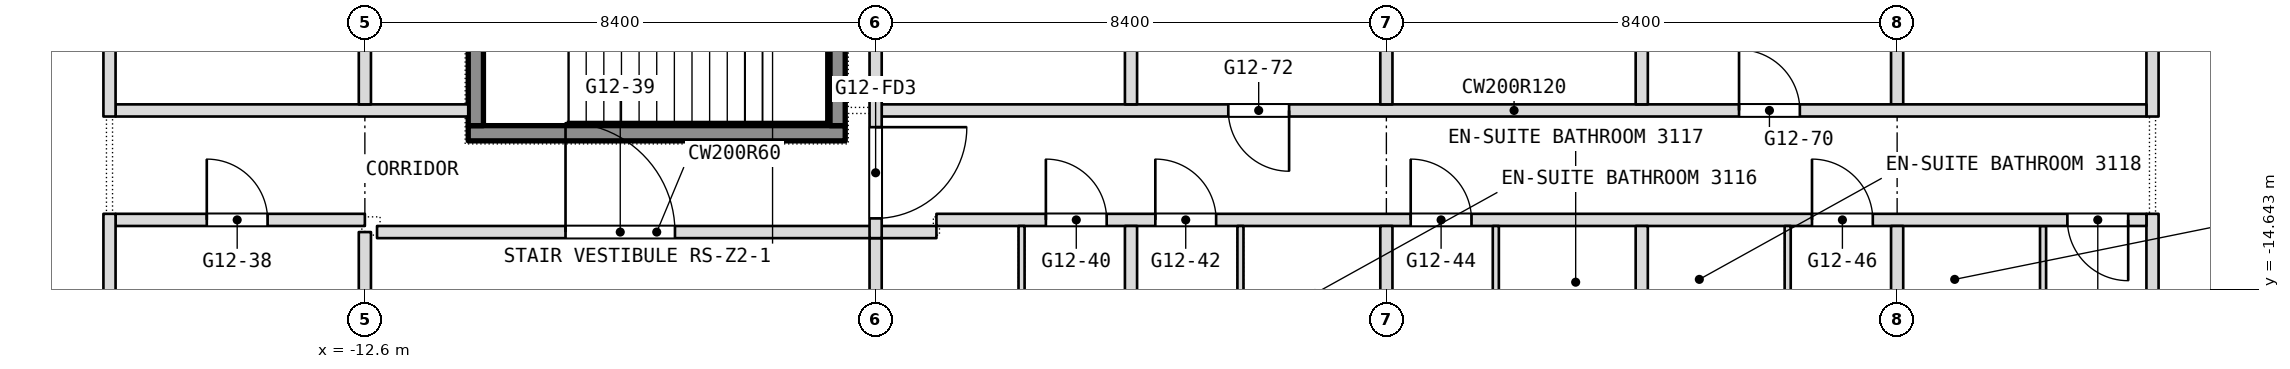
"""IFC4 building model, lengths in metres.
Left out: names, types, materials, properties, quantities, classifications, styles, units other than length and angle.
Written with IfcOpenShell. Run it as: python <this file> out.ifc"""

import sys

from ifc_helpers import new_model, si_unit, direction, frame, frame_2d, origin, place, context, subcontext, project, spatial, rectangle, extrude, element, fill, save


model = new_model("IFC4")
c1 = context("Model", 3, precision=1e-05, world=origin(), true_north=direction((0.0, 1.0)))
c2 = subcontext(c1, "Body", "Model", "MODEL_VIEW")
j1 = project(units=[si_unit("LENGTHUNIT", "METRE"), si_unit("PLANEANGLEUNIT", "RADIAN")], contexts=[c1])
p1 = place(None, origin())
s1 = spatial("IfcSite", under=j1, at=p1, CompositionType="ELEMENT")
p2 = place(p1, origin())
s2 = spatial("IfcBuilding", under=s1, at=p2, CompositionType="ELEMENT")
p3 = place(p2, frame((0.0, 0.0, 137.3)))
s3 = spatial("IfcBuildingStorey", under=s2, at=p3, CompositionType="ELEMENT", Elevation=137.3)
p4 = place(p3, frame((16.8, -22.186, 0.0), z_axis=(0.0, 0.0, 1.0), x_axis=(0.0, 1.0, 0.0)))
e1 = element("IfcWall", 1, at=p4, inside=s3, PredefinedType="PARTITIONING", context=c2, shape_type="SweptSolid", body=[
    extrude(rectangle(XDim=8.786, YDim=0.2, at=frame_2d((4.393, 0.0))), origin(), (0.0, 0.0, 1.0), 3.34),
])
p5 = place(p3, frame((16.8, -11.8, 0.0), z_axis=(0.0, 0.0, 1.0), x_axis=(0.0, 1.0, 0.0)))
e2 = element("IfcWall", 2, at=p5, inside=s3, PredefinedType="PARTITIONING", context=c2, shape_type="SweptSolid", body=[
    extrude(rectangle(XDim=9.9, YDim=0.2, at=frame_2d((4.95, 0.0))), origin(), (0.0, 0.0, 1.0), 3.34),
])
p6 = place(p3, frame((15.0, -16.25, 0.0), z_axis=(0.0, 0.0, 1.0), x_axis=(0.0, 1.0, 0.0)))
e3 = element("IfcWall", 3, at=p6, inside=s3, PredefinedType="PARTITIONING", context=c2, shape_type="SweptSolid", body=[
    extrude(rectangle(XDim=2.65, YDim=0.1, at=frame_2d((1.325, 0.0))), origin(), (0.0, 0.0, 1.0), 3.34),
])
p7 = place(p3, frame((-12.4, -13.7, 0.0), z_axis=(0.0, 0.0, 1.0), x_axis=(1.0, 0.0, 0.0)))
e4 = element("IfcWall", 4, at=p7, inside=s3, PredefinedType="PARTITIONING", context=c2, shape_type="SweptSolid", body=[
    extrude(rectangle(XDim=9.2, YDim=0.2, at=frame_2d((4.6, 0.0))), origin(), (0.0, 0.0, 1.0), 3.34),
])
p8 = place(p7, frame((3.1, 0.0, 0.0)))
e5 = element("IfcOpeningElement", 5, at=p8, cuts=e4, PredefinedType="OPENING", context=c2, shape_type="SweptSolid", body=[
    extrude(rectangle(XDim=1.8, YDim=2.1, at=frame_2d((0.9, 1.05))), frame((0.0, 0.1, 0.0), z_axis=(0.0, -1.0, 0.0), x_axis=(1.0, 0.0, 0.0)), (0.0, 0.0, 1.0), 0.2),
])
p9 = place(p3, frame((-16.7, -13.5, 0.0), z_axis=(0.0, 0.0, 1.0), x_axis=(1.0, 0.0, 0.0)))
e6 = element("IfcWall", 6, at=p9, inside=s3, PredefinedType="PARTITIONING", context=c2, shape_type="SweptSolid", body=[
    extrude(rectangle(XDim=4.1, YDim=0.2, at=frame_2d((2.05, 0.0))), origin(), (0.0, 0.0, 1.0), 3.34),
])
p10 = place(p9, frame((1.5, 0.0, 0.0)))
e7 = element("IfcOpeningElement", 7, at=p10, cuts=e6, PredefinedType="OPENING", context=c2, shape_type="SweptSolid", body=[
    extrude(rectangle(XDim=1.0, YDim=2.1, at=frame_2d((0.5, 1.05))), frame((0.0, 0.1, 0.0), z_axis=(0.0, -1.0, 0.0), x_axis=(1.0, 0.0, 0.0)), (0.0, 0.0, 1.0), 0.2),
])
p11 = place(p3, frame((-3.2, -13.5, 0.0), z_axis=(0.0, 0.0, 1.0), x_axis=(1.0, 0.0, 0.0)))
e8 = element("IfcWall", 8, at=p11, inside=s3, PredefinedType="PARTITIONING", context=c2, shape_type="SweptSolid", body=[
    extrude(rectangle(XDim=19.9, YDim=0.2, at=frame_2d((9.95, 0.0))), origin(), (0.0, 0.0, 1.0), 3.34),
])
p12 = place(p11, frame((1.8, 0.0, 0.0)))
e9 = element("IfcOpeningElement", 9, at=p12, cuts=e8, PredefinedType="OPENING", context=c2, shape_type="SweptSolid", body=[
    extrude(rectangle(XDim=1.0, YDim=2.1, at=frame_2d((0.5, 1.05))), frame((0.0, 0.1, 0.0), z_axis=(0.0, -1.0, 0.0), x_axis=(1.0, 0.0, 0.0)), (0.0, 0.0, 1.0), 0.2),
])
p13 = place(p11, frame((3.6, 0.0, 0.0)))
e10 = element("IfcOpeningElement", 10, at=p13, cuts=e8, PredefinedType="OPENING", context=c2, shape_type="SweptSolid", body=[
    extrude(rectangle(XDim=1.0, YDim=2.1, at=frame_2d((0.5, 1.05))), frame((0.0, 0.1, 0.0), z_axis=(0.0, -1.0, 0.0), x_axis=(1.0, 0.0, 0.0)), (0.0, 0.0, 1.0), 0.2),
])
p14 = place(p11, frame((7.8, 0.0, 0.0)))
e11 = element("IfcOpeningElement", 11, at=p14, cuts=e8, PredefinedType="OPENING", context=c2, shape_type="SweptSolid", body=[
    extrude(rectangle(XDim=1.0, YDim=2.1, at=frame_2d((0.5, 1.05))), frame((0.0, 0.1, 0.0), z_axis=(0.0, -1.0, 0.0), x_axis=(1.0, 0.0, 0.0)), (0.0, 0.0, 1.0), 0.2),
])
p15 = place(p11, frame((14.4, 0.0, 0.0)))
e12 = element("IfcOpeningElement", 12, at=p15, cuts=e8, PredefinedType="OPENING", context=c2, shape_type="SweptSolid", body=[
    extrude(rectangle(XDim=1.0, YDim=2.1, at=frame_2d((0.5, 1.05))), frame((0.0, 0.1, 0.0), z_axis=(0.0, -1.0, 0.0), x_axis=(1.0, 0.0, 0.0)), (0.0, 0.0, 1.0), 0.2),
])
p16 = place(p11, frame((18.6, 0.0, 0.0)))
e13 = element("IfcOpeningElement", 13, at=p16, cuts=e8, PredefinedType="OPENING", context=c2, shape_type="SweptSolid", body=[
    extrude(rectangle(XDim=1.0, YDim=2.1, at=frame_2d((0.5, 1.05))), frame((0.0, 0.1, 0.0), z_axis=(0.0, -1.0, 0.0), x_axis=(1.0, 0.0, 0.0)), (0.0, 0.0, 1.0), 0.2),
])
p17 = place(p3, frame((12.6, -21.175, 0.0), z_axis=(0.0, 0.0, 1.0), x_axis=(0.0, 1.0, 0.0)))
e14 = element("IfcWall", 14, at=p17, inside=s3, PredefinedType="PARTITIONING", context=c2, shape_type="SweptSolid", body=[
    extrude(rectangle(XDim=7.575, YDim=0.2, at=frame_2d((3.788, 0.0))), origin(), (0.0, 0.0, 1.0), 3.34),
])
p18 = place(p3, frame((12.6, -11.6, 0.0), z_axis=(0.0, 0.0, 1.0), x_axis=(0.0, 1.0, 0.0)))
e15 = element("IfcWall", 15, at=p18, inside=s3, PredefinedType="PARTITIONING", context=c2, shape_type="SweptSolid", body=[
    extrude(rectangle(XDim=3.9, YDim=0.2, at=frame_2d((1.95, 0.0))), origin(), (0.0, 0.0, 1.0), 3.34),
])
p19 = place(p3, frame((-16.7, -11.7, 0.0), z_axis=(0.0, 0.0, 1.0), x_axis=(1.0, 0.0, 0.0)))
e16 = element("IfcWall", 16, at=p19, inside=s3, PredefinedType="PARTITIONING", context=c2, shape_type="SweptSolid", body=[
    extrude(rectangle(XDim=5.8, YDim=0.2, at=frame_2d((2.9, 0.0))), origin(), (0.0, 0.0, 1.0), 3.34),
])
p20 = place(p3, frame((-4.1, -11.7, 0.0), z_axis=(0.0, 0.0, 1.0), x_axis=(1.0, 0.0, 0.0)))
e17 = element("IfcWall", 17, at=p20, inside=s3, PredefinedType="PARTITIONING", context=c2, shape_type="SweptSolid", body=[
    extrude(rectangle(XDim=20.8, YDim=0.2, at=frame_2d((10.4, 0.0))), origin(), (0.0, 0.0, 1.0), 3.34),
])
p21 = place(p20, frame((14.1, 0.0, 0.0)))
e18 = element("IfcOpeningElement", 18, at=p21, cuts=e17, PredefinedType="OPENING", context=c2, shape_type="SweptSolid", body=[
    extrude(rectangle(XDim=1.0, YDim=2.1, at=frame_2d((0.5, 1.05))), frame((0.0, 0.1, 0.0), z_axis=(0.0, -1.0, 0.0), x_axis=(1.0, 0.0, 0.0)), (0.0, 0.0, 1.0), 0.2),
])
p22 = place(p20, frame((5.7, 0.0, 0.0)))
e19 = element("IfcOpeningElement", 19, at=p22, cuts=e17, PredefinedType="OPENING", context=c2, shape_type="SweptSolid", body=[
    extrude(rectangle(XDim=1.0, YDim=2.1, at=frame_2d((0.5, 1.05))), frame((0.0, 0.1, 0.0), z_axis=(0.0, -1.0, 0.0), x_axis=(1.0, 0.0, 0.0)), (0.0, 0.0, 1.0), 0.2),
])
p23 = place(p3, frame((10.8, -16.25, 0.0), z_axis=(0.0, 0.0, 1.0), x_axis=(0.0, 1.0, 0.0)))
e20 = element("IfcWall", 20, at=p23, inside=s3, PredefinedType="PARTITIONING", context=c2, shape_type="SweptSolid", body=[
    extrude(rectangle(XDim=2.65, YDim=0.1, at=frame_2d((1.325, 0.0))), origin(), (0.0, 0.0, 1.0), 3.34),
])
p24 = place(p3, frame((8.4, -23.3, 0.0), z_axis=(0.0, 0.0, 1.0), x_axis=(0.0, 1.0, 0.0)))
e21 = element("IfcWall", 21, at=p24, inside=s3, PredefinedType="PARTITIONING", context=c2, shape_type="SweptSolid", body=[
    extrude(rectangle(XDim=9.7, YDim=0.2, at=frame_2d((4.85, 0.0))), origin(), (0.0, 0.0, 1.0), 3.34),
])
p25 = place(p3, frame((8.4, -11.6, 0.0), z_axis=(0.0, 0.0, 1.0), x_axis=(0.0, 1.0, 0.0)))
e22 = element("IfcWall", 22, at=p25, inside=s3, PredefinedType="PARTITIONING", context=c2, shape_type="SweptSolid", body=[
    extrude(rectangle(XDim=3.8, YDim=0.2, at=frame_2d((1.9, 0.0))), origin(), (0.0, 0.0, 1.0), 3.34),
])
p26 = place(p3, frame((6.0, -16.55, 0.0), z_axis=(0.0, 0.0, 1.0), x_axis=(0.0, 1.0, 0.0)))
e23 = element("IfcWall", 23, at=p26, inside=s3, PredefinedType="PARTITIONING", context=c2, shape_type="SweptSolid", body=[
    extrude(rectangle(XDim=2.95, YDim=0.1, at=frame_2d((1.475, 0.0))), origin(), (0.0, 0.0, 1.0), 3.34),
])
p27 = place(p3, frame((4.2, -23.3, 0.0), z_axis=(0.0, 0.0, 1.0), x_axis=(0.0, 1.0, 0.0)))
e24 = element("IfcWall", 24, at=p27, inside=s3, PredefinedType="PARTITIONING", context=c2, shape_type="SweptSolid", body=[
    extrude(rectangle(XDim=9.7, YDim=0.2, at=frame_2d((4.85, 0.0))), origin(), (0.0, 0.0, 1.0), 3.34),
])
p28 = place(p3, frame((4.2, -11.6, 0.0), z_axis=(0.0, 0.0, 1.0), x_axis=(0.0, 1.0, 0.0)))
e25 = element("IfcWall", 25, at=p28, inside=s3, PredefinedType="PARTITIONING", context=c2, shape_type="SweptSolid", body=[
    extrude(rectangle(XDim=9.7, YDim=0.2, at=frame_2d((4.85, 0.0))), origin(), (0.0, 0.0, 1.0), 3.34),
])
p29 = place(p3, frame((1.8, -16.95, 0.0), z_axis=(0.0, 0.0, 1.0), x_axis=(0.0, 1.0, 0.0)))
e26 = element("IfcWall", 26, at=p29, inside=s3, PredefinedType="PARTITIONING", context=c2, shape_type="SweptSolid", body=[
    extrude(rectangle(XDim=3.35, YDim=0.1, at=frame_2d((1.675, 0.0))), origin(), (0.0, 0.0, 1.0), 3.34),
])
p30 = place(p3, frame((0.0, -23.3, 0.0), z_axis=(0.0, 0.0, 1.0), x_axis=(0.0, 1.0, 0.0)))
e27 = element("IfcWall", 27, at=p30, inside=s3, PredefinedType="PARTITIONING", context=c2, shape_type="SweptSolid", body=[
    extrude(rectangle(XDim=9.7, YDim=0.2, at=frame_2d((4.85, 0.0))), origin(), (0.0, 0.0, 1.0), 3.34),
])
p31 = place(p3, frame((0.0, -11.6, 0.0), z_axis=(0.0, 0.0, 1.0), x_axis=(0.0, 1.0, 0.0)))
e28 = element("IfcWall", 28, at=p31, inside=s3, PredefinedType="PARTITIONING", context=c2, shape_type="SweptSolid", body=[
    extrude(rectangle(XDim=9.7, YDim=0.2, at=frame_2d((4.85, 0.0))), origin(), (0.0, 0.0, 1.0), 3.34),
])
p32 = place(p3, frame((-1.8, -17.65, 0.0), z_axis=(0.0, 0.0, 1.0), x_axis=(0.0, 1.0, 0.0)))
e29 = element("IfcWall", 29, at=p32, inside=s3, PredefinedType="PARTITIONING", context=c2, shape_type="SweptSolid", body=[
    extrude(rectangle(XDim=4.05, YDim=0.1, at=frame_2d((2.025, 0.0))), origin(), (0.0, 0.0, 1.0), 3.34),
])
p33 = place(p3, frame((-4.2, -23.3, 0.0), z_axis=(0.0, 0.0, 1.0), x_axis=(0.0, 1.0, 0.0)))
e30 = element("IfcWall", 30, at=p33, inside=s3, PredefinedType="PARTITIONING", context=c2, shape_type="SweptSolid", body=[
    extrude(rectangle(XDim=9.5, YDim=0.2, at=frame_2d((4.75, 0.0))), origin(), (0.0, 0.0, 1.0), 3.34),
])
p34 = place(p3, frame((-4.2, -13.8, 0.0), z_axis=(0.0, 0.0, 1.0), x_axis=(0.0, 1.0, 0.0)))
e31 = element("IfcWall", 31, at=p34, inside=s3, PredefinedType="PARTITIONING", context=c2, shape_type="SweptSolid", body=[
    extrude(rectangle(XDim=13.8, YDim=0.2, at=frame_2d((6.9, 0.0))), origin(), (0.0, 0.0, 1.0), 3.34),
])
p35 = place(p34, frame((12.15, 0.0, 0.0)))
e32 = element("IfcOpeningElement", 32, at=p35, cuts=e31, PredefinedType="OPENING", context=c2, shape_type="SweptSolid", body=[
    extrude(rectangle(XDim=1.5, YDim=2.1, at=frame_2d((0.75, 1.05))), frame((0.0, 0.1, 0.0), z_axis=(0.0, -1.0, 0.0), x_axis=(1.0, 0.0, 0.0)), (0.0, 0.0, 1.0), 0.2),
])
p36 = place(p34, frame((0.325, 0.0, 0.0)))
e33 = element("IfcOpeningElement", 33, at=p36, cuts=e31, PredefinedType="OPENING", context=c2, shape_type="SweptSolid", body=[
    extrude(rectangle(XDim=1.5, YDim=2.1, at=frame_2d((0.75, 1.05))), frame((0.0, 0.1, 0.0), z_axis=(0.0, -1.0, 0.0), x_axis=(1.0, 0.0, 0.0)), (0.0, 0.0, 1.0), 0.2),
])
p37 = place(p3, frame((-12.6, -21.175, 0.0), z_axis=(0.0, 0.0, 1.0), x_axis=(0.0, 1.0, 0.0)))
e34 = element("IfcWall", 34, at=p37, inside=s3, PredefinedType="PARTITIONING", context=c2, shape_type="SweptSolid", body=[
    extrude(rectangle(XDim=7.475, YDim=0.2, at=frame_2d((3.738, 0.0))), origin(), (0.0, 0.0, 1.0), 3.34),
])
p38 = place(p3, frame((-12.6, -11.6, 0.0), z_axis=(0.0, 0.0, 1.0), x_axis=(0.0, 1.0, 0.0)))
e35 = element("IfcWall", 35, at=p38, inside=s3, PredefinedType="PARTITIONING", context=c2, shape_type="SweptSolid", body=[
    extrude(rectangle(XDim=9.7, YDim=0.2, at=frame_2d((4.85, 0.0))), origin(), (0.0, 0.0, 1.0), 3.34),
])
p39 = place(p3, frame((-16.8, -22.186, 0.0), z_axis=(0.0, 0.0, 1.0), x_axis=(0.0, 1.0, 0.0)))
e36 = element("IfcWall", 36, at=p39, inside=s3, PredefinedType="PARTITIONING", context=c2, shape_type="SweptSolid", body=[
    extrude(rectangle(XDim=8.786, YDim=0.2, at=frame_2d((4.393, 0.0))), origin(), (0.0, 0.0, 1.0), 3.34),
])
p40 = place(p3, frame((-16.8, -11.8, 0.0), z_axis=(0.0, 0.0, 1.0), x_axis=(0.0, 1.0, 0.0)))
e37 = element("IfcWall", 37, at=p40, inside=s3, PredefinedType="PARTITIONING", context=c2, shape_type="SweptSolid", body=[
    extrude(rectangle(XDim=9.9, YDim=0.2, at=frame_2d((4.95, 0.0))), origin(), (0.0, 0.0, 1.0), 3.34),
])
p41 = place(p3, frame((-10.9, -12.075, 0.1), z_axis=(0.0, 0.0, 1.0), x_axis=(1.0, 0.0, 0.0)))
e38 = element("IfcWall", 38, at=p41, inside=s3, PredefinedType="SHEAR", context=c2, shape_type="SweptSolid", body=[
    extrude(rectangle(XDim=6.2, YDim=0.25, at=frame_2d((3.1, 0.0))), origin(), (0.0, 0.0, 1.0), 3.6),
])
for number, where, z_axis, x_axis in (
    (39, (-10.775, -11.95, 0.1), (0.0, 0.0, 1.0), (0.0, 1.0, 0.0)),
    (40, (-4.825, -11.95, 0.1), (0.0, 0.0, 1.0), (0.0, 1.0, 0.0)),
):
    element("IfcWall", number, at=place(p3, frame(where, z_axis=z_axis, x_axis=x_axis)), inside=s3, PredefinedType="SHEAR", context=c2, shape_type="SweptSolid", body=[
        extrude(rectangle(XDim=2.9, YDim=0.25, at=frame_2d((1.45, 0.0))), origin(), (0.0, 0.0, 1.0), 3.6),
    ])
p42 = place(p8, origin())
e41 = element("IfcDoor", 41, at=p42, inside=s3, OperationType="DOUBLE_DOOR_SINGLE_SWING", PredefinedType="DOOR", context=c2, shape_type="SweptSolid", body=[
    extrude(rectangle(XDim=1.8, YDim=2.1, at=frame_2d((0.9, 1.05))), frame((0.0, 0.025, 0.0), z_axis=(0.0, -1.0, 0.0), x_axis=(1.0, 0.0, 0.0)), (0.0, 0.0, 1.0), 0.05),
])
fill(e5, e41)
p43 = place(p10, origin())
e42 = element("IfcDoor", 42, at=p43, inside=s3, OperationType="SINGLE_SWING_LEFT", PredefinedType="DOOR", context=c2, shape_type="SweptSolid", body=[
    extrude(rectangle(XDim=1.0, YDim=2.1, at=frame_2d((0.5, 1.05))), frame((0.0, 0.025, 0.0), z_axis=(0.0, -1.0, 0.0), x_axis=(1.0, 0.0, 0.0)), (0.0, 0.0, 1.0), 0.05),
])
fill(e7, e42)
p44 = place(p12, origin())
e43 = element("IfcDoor", 43, at=p44, inside=s3, OperationType="SINGLE_SWING_RIGHT", PredefinedType="DOOR", context=c2, shape_type="SweptSolid", body=[
    extrude(rectangle(XDim=1.0, YDim=2.1, at=frame_2d((0.5, 1.05))), frame((0.0, 0.025, 0.0), z_axis=(0.0, -1.0, 0.0), x_axis=(1.0, 0.0, 0.0)), (0.0, 0.0, 1.0), 0.05),
])
fill(e9, e43)
p45 = place(p13, origin())
e44 = element("IfcDoor", 44, at=p45, inside=s3, OperationType="SINGLE_SWING_RIGHT", PredefinedType="DOOR", context=c2, shape_type="SweptSolid", body=[
    extrude(rectangle(XDim=1.0, YDim=2.1, at=frame_2d((0.5, 1.05))), frame((0.0, 0.025, 0.0), z_axis=(0.0, -1.0, 0.0), x_axis=(1.0, 0.0, 0.0)), (0.0, 0.0, 1.0), 0.05),
])
fill(e10, e44)
p46 = place(p14, origin())
e45 = element("IfcDoor", 45, at=p46, inside=s3, OperationType="SINGLE_SWING_RIGHT", PredefinedType="DOOR", context=c2, shape_type="SweptSolid", body=[
    extrude(rectangle(XDim=1.0, YDim=2.1, at=frame_2d((0.5, 1.05))), frame((0.0, 0.025, 0.0), z_axis=(0.0, -1.0, 0.0), x_axis=(1.0, 0.0, 0.0)), (0.0, 0.0, 1.0), 0.05),
])
fill(e11, e45)
p47 = place(p15, origin())
e46 = element("IfcDoor", 46, at=p47, inside=s3, OperationType="SINGLE_SWING_RIGHT", PredefinedType="DOOR", context=c2, shape_type="SweptSolid", body=[
    extrude(rectangle(XDim=1.0, YDim=2.1, at=frame_2d((0.5, 1.05))), frame((0.0, 0.025, 0.0), z_axis=(0.0, -1.0, 0.0), x_axis=(1.0, 0.0, 0.0)), (0.0, 0.0, 1.0), 0.05),
])
fill(e12, e46)
p48 = place(p16, origin())
e47 = element("IfcDoor", 47, at=p48, inside=s3, OperationType="SINGLE_SWING_LEFT", PredefinedType="DOOR", context=c2, shape_type="SweptSolid", body=[
    extrude(rectangle(XDim=1.0, YDim=2.1, at=frame_2d((0.5, 1.05))), frame((0.0, 0.025, 0.0), z_axis=(0.0, -1.0, 0.0), x_axis=(1.0, 0.0, 0.0)), (0.0, 0.0, 1.0), 0.05),
])
fill(e13, e47)
p49 = place(p21, origin())
e48 = element("IfcDoor", 48, at=p49, inside=s3, OperationType="SINGLE_SWING_RIGHT", PredefinedType="DOOR", context=c2, shape_type="SweptSolid", body=[
    extrude(rectangle(XDim=1.0, YDim=2.1, at=frame_2d((0.5, 1.05))), frame((0.0, 0.025, 0.0), z_axis=(0.0, -1.0, 0.0), x_axis=(1.0, 0.0, 0.0)), (0.0, 0.0, 1.0), 0.05),
])
fill(e18, e48)
p50 = place(p22, origin())
e49 = element("IfcDoor", 49, at=p50, inside=s3, OperationType="SINGLE_SWING_RIGHT", PredefinedType="DOOR", context=c2, shape_type="SweptSolid", body=[
    extrude(rectangle(XDim=1.0, YDim=2.1, at=frame_2d((0.5, 1.05))), frame((0.0, 0.025, 0.0), z_axis=(0.0, -1.0, 0.0), x_axis=(1.0, 0.0, 0.0)), (0.0, 0.0, 1.0), 0.05),
])
fill(e19, e49)
p51 = place(p36, origin())
e50 = element("IfcDoor", 50, at=p51, inside=s3, OperationType="DOUBLE_DOOR_DOUBLE_SWING", PredefinedType="DOOR", context=c2, shape_type="SweptSolid", body=[
    extrude(rectangle(XDim=1.5, YDim=2.1, at=frame_2d((0.75, 1.05))), frame((0.0, 0.025, 0.0), z_axis=(0.0, -1.0, 0.0), x_axis=(1.0, 0.0, 0.0)), (0.0, 0.0, 1.0), 0.05),
])
fill(e33, e50)
save(model, sys.argv[1])
